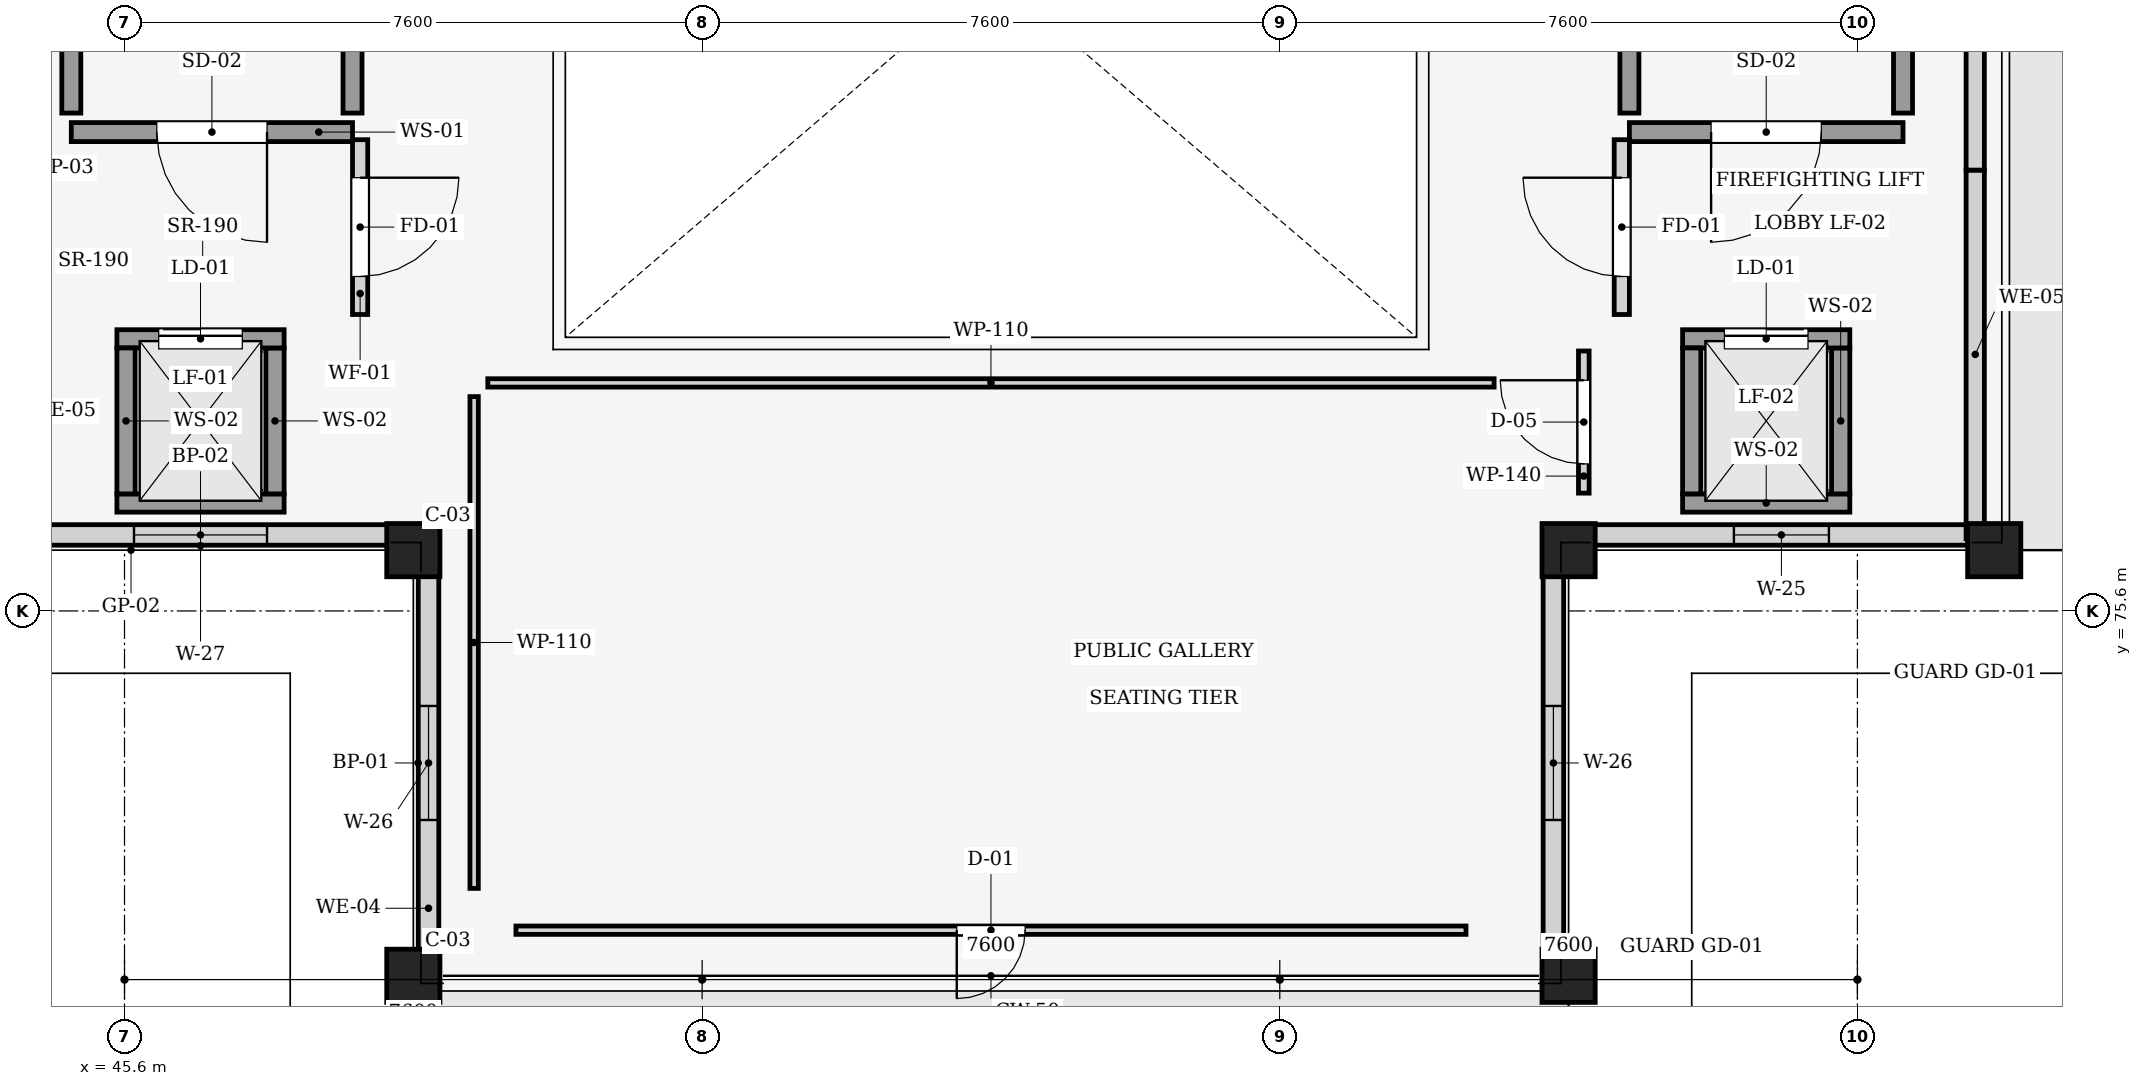
"""IFC4 building model, lengths in metres.
Left out: names, types, materials, properties, quantities, classifications, styles, units other than length and angle.
Written with IfcOpenShell. Run it as: python <this file> out.ifc"""

import sys

from ifc_helpers import new_model, si_unit, direction, frame, frame_2d, origin, origin_2d, place, context, subcontext, project, spatial, rectangle, extrude, element, fill, save


model = new_model("IFC4")
c1 = context("Model", 3, precision=1e-05, world=origin(), true_north=direction((0.0, 1.0)))
c2 = subcontext(c1, "Body", "Model", "MODEL_VIEW")
j1 = project(units=[si_unit("LENGTHUNIT", "METRE"), si_unit("PLANEANGLEUNIT", "RADIAN")], contexts=[c1])
p1 = place(None, origin())
s1 = spatial("IfcSite", under=j1, at=p1, CompositionType="ELEMENT")
p2 = place(p1, origin())
s2 = spatial("IfcBuilding", under=s1, at=p2, CompositionType="ELEMENT")
p3 = place(p2, frame((0.0, 0.0, 29.4)))
s3 = spatial("IfcBuildingStorey", under=s2, at=p3, CompositionType="ELEMENT", Elevation=29.4)
for number, where, z_axis, x_axis in (
    (1, (49.4, 70.8, 0.0), (0.0, 0.0, 1.0), (1.0, 0.0, 0.0)),
    (2, (49.4, 76.4, 0.0), (0.0, 0.0, 1.0), (1.0, 0.0, 0.0)),
    (3, (64.6, 70.8, 0.0), (0.0, 0.0, 1.0), (1.0, 0.0, 0.0)),
    (4, (64.6, 76.4, 0.0), (0.0, 0.0, 1.0), (1.0, 0.0, 0.0)),
):
    element("IfcColumn", number, at=place(p3, frame(where, z_axis=z_axis, x_axis=x_axis)), inside=s3, PredefinedType="COLUMN", context=c2, shape_type="SweptSolid", body=[
        extrude(rectangle(XDim=0.7, YDim=0.7, at=origin_2d()), origin(), (0.0, 0.0, 1.0), 5.0),
    ])
p4 = place(p3, frame((70.2, 76.4, 0.0), z_axis=(0.0, 0.0, 1.0), x_axis=(1.0, 0.0, 0.0)))
e5 = element("IfcColumn", 5, at=p4, inside=s3, PredefinedType="COLUMN", context=c2, shape_type="SweptSolid", body=[
    extrude(rectangle(XDim=0.7, YDim=0.7, at=origin_2d()), origin(), (0.0, 0.0, 1.0), 8.14),
])
p5 = place(p3, frame((49.6, 71.085, 0.0), z_axis=(0.0, 0.0, 1.0), x_axis=(0.0, 1.0, 0.0)))
e6 = element("IfcWall", 6, at=p5, inside=s3, PredefinedType="STANDARD", context=c2, shape_type="SweptSolid", body=[
    extrude(rectangle(XDim=5.03, YDim=0.27, at=frame_2d((2.515, 0.0))), origin(), (0.0, 0.0, 1.0), 4.425),
])
p6 = place(p5, frame((1.765, 0.0, 0.85)))
e7 = element("IfcOpeningElement", 7, at=p6, cuts=e6, PredefinedType="OPENING", context=c2, shape_type="SweptSolid", body=[
    extrude(rectangle(XDim=1.5, YDim=1.85, at=frame_2d((0.75, 0.925))), frame((0.0, 0.145, 0.0), z_axis=(0.0, -1.0, 0.0), x_axis=(1.0, 0.0, 0.0)), (0.0, 0.0, 1.0), 0.29),
])
p7 = place(p3, frame((49.115, 76.6, 0.0), z_axis=(0.0, 0.0, 1.0), x_axis=(-1.0, 0.0, 0.0)))
e8 = element("IfcWall", 8, at=p7, inside=s3, PredefinedType="STANDARD", context=c2, shape_type="SweptSolid", body=[
    extrude(rectangle(XDim=5.03, YDim=0.27, at=frame_2d((2.515, 0.0))), origin(), (0.0, 0.0, 1.0), 4.425),
])
p8 = place(p7, frame((1.64, 0.0, 0.85)))
e9 = element("IfcOpeningElement", 9, at=p8, cuts=e8, PredefinedType="OPENING", context=c2, shape_type="SweptSolid", body=[
    extrude(rectangle(XDim=1.75, YDim=1.85, at=frame_2d((0.875, 0.925))), frame((0.0, 0.145, 0.0), z_axis=(0.0, -1.0, 0.0), x_axis=(1.0, 0.0, 0.0)), (0.0, 0.0, 1.0), 0.29),
])
p9 = place(p3, frame((69.915, 76.6, 0.0), z_axis=(0.0, 0.0, 1.0), x_axis=(-1.0, 0.0, 0.0)))
e10 = element("IfcWall", 10, at=p9, inside=s3, PredefinedType="STANDARD", context=c2, shape_type="SweptSolid", body=[
    extrude(rectangle(XDim=5.03, YDim=0.27, at=frame_2d((2.515, 0.0))), origin(), (0.0, 0.0, 1.0), 4.425),
])
p10 = place(p9, frame((1.89, 0.0, 0.85)))
e11 = element("IfcOpeningElement", 11, at=p10, cuts=e10, PredefinedType="OPENING", context=c2, shape_type="SweptSolid", body=[
    extrude(rectangle(XDim=1.25, YDim=1.85, at=frame_2d((0.625, 0.925))), frame((0.0, 0.145, 0.0), z_axis=(0.0, -1.0, 0.0), x_axis=(1.0, 0.0, 0.0)), (0.0, 0.0, 1.0), 0.29),
])
p11 = place(p3, frame((64.4, 76.115, 0.0), z_axis=(0.0, 0.0, 1.0), x_axis=(0.0, -1.0, 0.0)))
e12 = element("IfcWall", 12, at=p11, inside=s3, PredefinedType="STANDARD", context=c2, shape_type="SweptSolid", body=[
    extrude(rectangle(XDim=5.03, YDim=0.27, at=frame_2d((2.515, 0.0))), origin(), (0.0, 0.0, 1.0), 4.425),
])
p12 = place(p11, frame((1.765, 0.0, 0.85)))
e13 = element("IfcOpeningElement", 13, at=p12, cuts=e12, PredefinedType="OPENING", context=c2, shape_type="SweptSolid", body=[
    extrude(rectangle(XDim=1.5, YDim=1.85, at=frame_2d((0.75, 0.925))), frame((0.0, 0.145, 0.0), z_axis=(0.0, -1.0, 0.0), x_axis=(1.0, 0.0, 0.0)), (0.0, 0.0, 1.0), 0.29),
])
p13 = place(p3, frame((69.95, 81.4, 4.7), z_axis=(0.0, 0.0, 1.0), x_axis=(0.0, -1.0, 0.0)))
e14 = element("IfcWall", 14, at=p13, inside=s3, PredefinedType="STANDARD", context=c2, shape_type="SweptSolid", body=[
    extrude(rectangle(XDim=4.85, YDim=0.24, at=frame_2d((2.425, 0.0))), origin(), (0.0, 0.0, 1.0), 3.8),
])
p14 = place(p3, frame((69.95, 86.6, 4.7), z_axis=(0.0, 0.0, 1.0), x_axis=(0.0, -1.0, 0.0)))
e15 = element("IfcWall", 15, at=p14, inside=s3, PredefinedType="STANDARD", context=c2, shape_type="SweptSolid", body=[
    extrude(rectangle(XDim=5.2, YDim=0.24, at=frame_2d((2.6, 0.0))), origin(), (0.0, 0.0, 1.0), 4.85),
])
p15 = place(p3, frame((48.6, 81.9, 0.0), z_axis=(0.0, 0.0, 1.0), x_axis=(-1.0, 0.0, 0.0)))
e16 = element("IfcWall", 16, at=p15, inside=s3, PredefinedType="SHEAR", context=c2, shape_type="SweptSolid", body=[
    extrude(rectangle(XDim=3.7, YDim=0.25, at=frame_2d((1.85, 0.0))), origin(), (0.0, 0.0, 1.0), 4.75),
])
p16 = place(p15, frame((1.125, 0.0, 0.0)))
e17 = element("IfcOpeningElement", 17, at=p16, cuts=e16, PredefinedType="OPENING", context=c2, shape_type="SweptSolid", body=[
    extrude(rectangle(XDim=1.45, YDim=2.2, at=frame_2d((0.725, 1.1))), frame((0.0, 0.135, 0.0), z_axis=(0.0, -1.0, 0.0), x_axis=(1.0, 0.0, 0.0)), (0.0, 0.0, 1.0), 0.27),
])
for number, where, z_axis, x_axis in (
    (18, (44.9, 82.15, 0.0), (0.0, 0.0, 1.0), (0.0, 1.0, 0.0)),
    (19, (48.6, 89.85, 0.0), (0.0, 0.0, 1.0), (0.0, -1.0, 0.0)),
):
    element("IfcWall", number, at=place(p3, frame(where, z_axis=z_axis, x_axis=x_axis)), inside=s3, PredefinedType="SHEAR", context=c2, shape_type="SweptSolid", body=[
        extrude(rectangle(XDim=7.7, YDim=0.25, at=frame_2d((3.85, 0.0))), origin(), (0.0, 0.0, 1.0), 4.75),
    ])
p17 = place(p3, frame((69.0, 81.9, 0.0), z_axis=(0.0, 0.0, 1.0), x_axis=(-1.0, 0.0, 0.0)))
e20 = element("IfcWall", 20, at=p17, inside=s3, PredefinedType="SHEAR", context=c2, shape_type="SweptSolid", body=[
    extrude(rectangle(XDim=3.6, YDim=0.25, at=frame_2d((1.8, 0.0))), origin(), (0.0, 0.0, 1.0), 4.75),
])
p18 = place(p17, frame((1.075, 0.0, 0.0)))
e21 = element("IfcOpeningElement", 21, at=p18, cuts=e20, PredefinedType="OPENING", context=c2, shape_type="SweptSolid", body=[
    extrude(rectangle(XDim=1.45, YDim=2.2, at=frame_2d((0.725, 1.1))), frame((0.0, 0.135, 0.0), z_axis=(0.0, -1.0, 0.0), x_axis=(1.0, 0.0, 0.0)), (0.0, 0.0, 1.0), 0.27),
])
for number, where, z_axis, x_axis in (
    (22, (65.4, 82.15, 0.0), (0.0, 0.0, 1.0), (0.0, 1.0, 0.0)),
    (23, (69.0, 89.85, 0.0), (0.0, 0.0, 1.0), (0.0, -1.0, 0.0)),
):
    element("IfcWall", number, at=place(p3, frame(where, z_axis=z_axis, x_axis=x_axis)), inside=s3, PredefinedType="SHEAR", context=c2, shape_type="SweptSolid", body=[
        extrude(rectangle(XDim=7.7, YDim=0.25, at=frame_2d((3.85, 0.0))), origin(), (0.0, 0.0, 1.0), 4.75),
    ])
p19 = place(p3, frame((47.7, 77.02, 0.0), z_axis=(0.0, 0.0, 1.0), x_axis=(-1.0, 0.0, 0.0)))
e24 = element("IfcWall", 24, at=p19, inside=s3, PredefinedType="SHEAR", context=c2, shape_type="SweptSolid", body=[
    extrude(rectangle(XDim=2.2, YDim=0.24, at=frame_2d((1.1, 0.0))), origin(), (0.0, 0.0, 1.0), 4.75),
])
p20 = place(p3, frame((47.58, 79.06, 0.0), z_axis=(0.0, 0.0, 1.0), x_axis=(0.0, -1.0, 0.0)))
e25 = element("IfcWall", 25, at=p20, inside=s3, PredefinedType="SHEAR", context=c2, shape_type="SweptSolid", body=[
    extrude(rectangle(XDim=1.92, YDim=0.24, at=frame_2d((0.96, 0.0))), origin(), (0.0, 0.0, 1.0), 4.75),
])
p21 = place(p3, frame((45.5, 79.18, 0.0), z_axis=(0.0, 0.0, 1.0), x_axis=(1.0, 0.0, 0.0)))
e26 = element("IfcWall", 26, at=p21, inside=s3, PredefinedType="SHEAR", context=c2, shape_type="SweptSolid", body=[
    extrude(rectangle(XDim=2.2, YDim=0.24, at=frame_2d((1.1, 0.0))), origin(), (0.0, 0.0, 1.0), 4.75),
])
p22 = place(p21, frame((0.55, 0.0, 0.0)))
e27 = element("IfcOpeningElement", 27, at=p22, cuts=e26, PredefinedType="OPENING", context=c2, shape_type="SweptSolid", body=[
    extrude(rectangle(XDim=1.1, YDim=2.15, at=frame_2d((0.55, 1.075))), frame((0.0, 0.13, 0.0), z_axis=(0.0, -1.0, 0.0), x_axis=(1.0, 0.0, 0.0)), (0.0, 0.0, 1.0), 0.26),
])
p23 = place(p3, frame((45.62, 77.14, 0.0), z_axis=(0.0, 0.0, 1.0), x_axis=(0.0, 1.0, 0.0)))
e28 = element("IfcWall", 28, at=p23, inside=s3, PredefinedType="SHEAR", context=c2, shape_type="SweptSolid", body=[
    extrude(rectangle(XDim=1.92, YDim=0.24, at=frame_2d((0.96, 0.0))), origin(), (0.0, 0.0, 1.0), 4.75),
])
p24 = place(p3, frame((48.7, 81.8, 0.0), z_axis=(0.0, 0.0, 1.0), x_axis=(0.0, -1.0, 0.0)))
e29 = element("IfcWall", 29, at=p24, inside=s3, PredefinedType="PARTITIONING", context=c2, shape_type="SweptSolid", body=[
    extrude(rectangle(XDim=2.3, YDim=0.2, at=frame_2d((1.15, 0.0))), origin(), (0.0, 0.0, 1.0), 2.9),
])
p25 = place(p24, frame((0.5, 0.0, 0.0)))
e30 = element("IfcOpeningElement", 30, at=p25, cuts=e29, PredefinedType="OPENING", context=c2, shape_type="SweptSolid", body=[
    extrude(rectangle(XDim=1.3, YDim=2.2, at=frame_2d((0.65, 1.1))), frame((0.0, 0.11, 0.0), z_axis=(0.0, -1.0, 0.0), x_axis=(1.0, 0.0, 0.0)), (0.0, 0.0, 1.0), 0.22),
])
p26 = place(p3, frame((68.3, 77.02, 0.0), z_axis=(0.0, 0.0, 1.0), x_axis=(-1.0, 0.0, 0.0)))
e31 = element("IfcWall", 31, at=p26, inside=s3, PredefinedType="SHEAR", context=c2, shape_type="SweptSolid", body=[
    extrude(rectangle(XDim=2.2, YDim=0.24, at=frame_2d((1.1, 0.0))), origin(), (0.0, 0.0, 1.0), 4.75),
])
p27 = place(p3, frame((68.18, 79.06, 0.0), z_axis=(0.0, 0.0, 1.0), x_axis=(0.0, -1.0, 0.0)))
e32 = element("IfcWall", 32, at=p27, inside=s3, PredefinedType="SHEAR", context=c2, shape_type="SweptSolid", body=[
    extrude(rectangle(XDim=1.92, YDim=0.24, at=frame_2d((0.96, 0.0))), origin(), (0.0, 0.0, 1.0), 4.75),
])
p28 = place(p3, frame((66.1, 79.18, 0.0), z_axis=(0.0, 0.0, 1.0), x_axis=(1.0, 0.0, 0.0)))
e33 = element("IfcWall", 33, at=p28, inside=s3, PredefinedType="SHEAR", context=c2, shape_type="SweptSolid", body=[
    extrude(rectangle(XDim=2.2, YDim=0.24, at=frame_2d((1.1, 0.0))), origin(), (0.0, 0.0, 1.0), 4.75),
])
p29 = place(p28, frame((0.55, 0.0, 0.0)))
e34 = element("IfcOpeningElement", 34, at=p29, cuts=e33, PredefinedType="OPENING", context=c2, shape_type="SweptSolid", body=[
    extrude(rectangle(XDim=1.1, YDim=2.15, at=frame_2d((0.55, 1.075))), frame((0.0, 0.13, 0.0), z_axis=(0.0, -1.0, 0.0), x_axis=(1.0, 0.0, 0.0)), (0.0, 0.0, 1.0), 0.26),
])
p30 = place(p3, frame((66.22, 77.14, 0.0), z_axis=(0.0, 0.0, 1.0), x_axis=(0.0, 1.0, 0.0)))
e35 = element("IfcWall", 35, at=p30, inside=s3, PredefinedType="SHEAR", context=c2, shape_type="SweptSolid", body=[
    extrude(rectangle(XDim=1.92, YDim=0.24, at=frame_2d((0.96, 0.0))), origin(), (0.0, 0.0, 1.0), 4.75),
])
p31 = place(p3, frame((65.3, 79.5, 0.0), z_axis=(0.0, 0.0, 1.0), x_axis=(0.0, 1.0, 0.0)))
e36 = element("IfcWall", 36, at=p31, inside=s3, PredefinedType="PARTITIONING", context=c2, shape_type="SweptSolid", body=[
    extrude(rectangle(XDim=2.3, YDim=0.2, at=frame_2d((1.15, 0.0))), origin(), (0.0, 0.0, 1.0), 2.9),
])
p32 = place(p31, frame((0.5, 0.0, 0.0)))
e37 = element("IfcOpeningElement", 37, at=p32, cuts=e36, PredefinedType="OPENING", context=c2, shape_type="SweptSolid", body=[
    extrude(rectangle(XDim=1.3, YDim=2.2, at=frame_2d((0.65, 1.1))), frame((0.0, 0.11, 0.0), z_axis=(0.0, -1.0, 0.0), x_axis=(1.0, 0.0, 0.0)), (0.0, 0.0, 1.0), 0.22),
])
p33 = place(p3, frame((50.2, 71.95, 0.0), z_axis=(0.0, 0.0, 1.0), x_axis=(0.0, 1.0, 0.0)))
e38 = element("IfcWall", 38, at=p33, inside=s3, PredefinedType="PARTITIONING", context=c2, shape_type="SweptSolid", body=[
    extrude(rectangle(XDim=6.47, YDim=0.11, at=frame_2d((3.235, 0.0))), origin(), (0.0, 0.0, 1.0), 4.57),
])
p34 = place(p3, frame((50.38, 78.6, 0.0), z_axis=(0.0, 0.0, 1.0), x_axis=(1.0, 0.0, 0.0)))
e39 = element("IfcWall", 39, at=p34, inside=s3, PredefinedType="PARTITIONING", context=c2, shape_type="SweptSolid", body=[
    extrude(rectangle(XDim=13.24, YDim=0.11, at=frame_2d((6.62, 0.0))), origin(), (0.0, 0.0, 1.0), 4.57),
])
p35 = place(p3, frame((63.25, 71.4, 0.0), z_axis=(0.0, 0.0, 1.0), x_axis=(-1.0, 0.0, 0.0)))
e40 = element("IfcWall", 40, at=p35, inside=s3, PredefinedType="PARTITIONING", context=c2, shape_type="SweptSolid", body=[
    extrude(rectangle(XDim=12.5, YDim=0.11, at=frame_2d((6.25, 0.0))), origin(), (0.0, 0.0, 1.0), 4.57),
])
p36 = place(p35, frame((5.8, 0.0, 0.0)))
e41 = element("IfcOpeningElement", 41, at=p36, cuts=e40, PredefinedType="OPENING", context=c2, shape_type="SweptSolid", body=[
    extrude(rectangle(XDim=0.9, YDim=2.1, at=frame_2d((0.45, 1.05))), frame((0.0, 0.065, 0.0), z_axis=(0.0, -1.0, 0.0), x_axis=(1.0, 0.0, 0.0)), (0.0, 0.0, 1.0), 0.13),
])
p37 = place(p3, frame((64.8, 77.15, 0.0), z_axis=(0.0, 0.0, 1.0), x_axis=(0.0, 1.0, 0.0)))
e42 = element("IfcWall", 42, at=p37, inside=s3, PredefinedType="PARTITIONING", context=c2, shape_type="SweptSolid", body=[
    extrude(rectangle(XDim=1.87, YDim=0.14, at=frame_2d((0.935, 0.0))), origin(), (0.0, 0.0, 1.0), 4.57),
])
p38 = place(p37, frame((0.385, 0.0, 0.0)))
e43 = element("IfcOpeningElement", 43, at=p38, cuts=e42, PredefinedType="OPENING", context=c2, shape_type="SweptSolid", body=[
    extrude(rectangle(XDim=1.1, YDim=2.1, at=frame_2d((0.55, 1.05))), frame((0.0, 0.08, 0.0), z_axis=(0.0, -1.0, 0.0), x_axis=(1.0, 0.0, 0.0)), (0.0, 0.0, 1.0), 0.16),
])
p39 = place(p6, origin())
e44 = element("IfcWindow", 44, at=p39, inside=s3, PartitioningType="SINGLE_PANEL", PredefinedType="WINDOW", context=c2, shape_type="SweptSolid", body=[
    extrude(rectangle(XDim=1.5, YDim=1.85, at=frame_2d((0.75, 0.925))), frame((0.0, 0.03, 0.0), z_axis=(0.0, -1.0, 0.0), x_axis=(1.0, 0.0, 0.0)), (0.0, 0.0, 1.0), 0.06),
])
fill(e7, e44)
p40 = place(p8, origin())
e45 = element("IfcWindow", 45, at=p40, inside=s3, PartitioningType="SINGLE_PANEL", PredefinedType="WINDOW", context=c2, shape_type="SweptSolid", body=[
    extrude(rectangle(XDim=1.75, YDim=1.85, at=frame_2d((0.875, 0.925))), frame((0.0, 0.03, 0.0), z_axis=(0.0, -1.0, 0.0), x_axis=(1.0, 0.0, 0.0)), (0.0, 0.0, 1.0), 0.06),
])
fill(e9, e45)
p41 = place(p10, origin())
e46 = element("IfcWindow", 46, at=p41, inside=s3, PartitioningType="SINGLE_PANEL", PredefinedType="WINDOW", context=c2, shape_type="SweptSolid", body=[
    extrude(rectangle(XDim=1.25, YDim=1.85, at=frame_2d((0.625, 0.925))), frame((0.0, 0.03, 0.0), z_axis=(0.0, -1.0, 0.0), x_axis=(1.0, 0.0, 0.0)), (0.0, 0.0, 1.0), 0.06),
])
fill(e11, e46)
p42 = place(p12, origin())
e47 = element("IfcWindow", 47, at=p42, inside=s3, PartitioningType="SINGLE_PANEL", PredefinedType="WINDOW", context=c2, shape_type="SweptSolid", body=[
    extrude(rectangle(XDim=1.5, YDim=1.85, at=frame_2d((0.75, 0.925))), frame((0.0, 0.03, 0.0), z_axis=(0.0, -1.0, 0.0), x_axis=(1.0, 0.0, 0.0)), (0.0, 0.0, 1.0), 0.06),
])
fill(e13, e47)
p43 = place(p16, origin())
e48 = element("IfcDoor", 48, at=p43, inside=s3, OperationType="SINGLE_SWING_LEFT", PredefinedType="DOOR", context=c2, shape_type="SweptSolid", body=[
    extrude(rectangle(XDim=1.45, YDim=2.2, at=frame_2d((0.725, 1.1))), frame((0.0, 0.025, 0.0), z_axis=(0.0, -1.0, 0.0), x_axis=(1.0, 0.0, 0.0)), (0.0, 0.0, 1.0), 0.05),
])
fill(e17, e48)
p44 = place(p18, origin())
e49 = element("IfcDoor", 49, at=p44, inside=s3, OperationType="SINGLE_SWING_RIGHT", PredefinedType="DOOR", context=c2, shape_type="SweptSolid", body=[
    extrude(rectangle(XDim=1.45, YDim=2.2, at=frame_2d((0.725, 1.1))), frame((0.0, 0.025, 0.0), z_axis=(0.0, -1.0, 0.0), x_axis=(1.0, 0.0, 0.0)), (0.0, 0.0, 1.0), 0.05),
])
fill(e21, e49)
p45 = place(p22, origin())
e50 = element("IfcDoor", 50, at=p45, inside=s3, OperationType="SLIDING_TO_LEFT", PredefinedType="DOOR", context=c2, shape_type="SweptSolid", body=[
    extrude(rectangle(XDim=1.1, YDim=2.15, at=frame_2d((0.55, 1.075))), frame((0.0, 0.025, 0.0), z_axis=(0.0, -1.0, 0.0), x_axis=(1.0, 0.0, 0.0)), (0.0, 0.0, 1.0), 0.05),
])
fill(e27, e50)
p46 = place(p25, origin())
e51 = element("IfcDoor", 51, at=p46, inside=s3, OperationType="SINGLE_SWING_LEFT", PredefinedType="DOOR", context=c2, shape_type="SweptSolid", body=[
    extrude(rectangle(XDim=1.3, YDim=2.2, at=frame_2d((0.65, 1.1))), frame((0.0, 0.025, 0.0), z_axis=(0.0, -1.0, 0.0), x_axis=(1.0, 0.0, 0.0)), (0.0, 0.0, 1.0), 0.05),
])
fill(e30, e51)
p47 = place(p29, origin())
e52 = element("IfcDoor", 52, at=p47, inside=s3, OperationType="SLIDING_TO_RIGHT", PredefinedType="DOOR", context=c2, shape_type="SweptSolid", body=[
    extrude(rectangle(XDim=1.1, YDim=2.15, at=frame_2d((0.55, 1.075))), frame((0.0, 0.025, 0.0), z_axis=(0.0, -1.0, 0.0), x_axis=(1.0, 0.0, 0.0)), (0.0, 0.0, 1.0), 0.05),
])
fill(e34, e52)
p48 = place(p32, origin())
e53 = element("IfcDoor", 53, at=p48, inside=s3, OperationType="SINGLE_SWING_RIGHT", PredefinedType="DOOR", context=c2, shape_type="SweptSolid", body=[
    extrude(rectangle(XDim=1.3, YDim=2.2, at=frame_2d((0.65, 1.1))), frame((0.0, 0.025, 0.0), z_axis=(0.0, -1.0, 0.0), x_axis=(1.0, 0.0, 0.0)), (0.0, 0.0, 1.0), 0.05),
])
fill(e37, e53)
p49 = place(p36, origin())
e54 = element("IfcDoor", 54, at=p49, inside=s3, OperationType="SINGLE_SWING_RIGHT", PredefinedType="DOOR", context=c2, shape_type="SweptSolid", body=[
    extrude(rectangle(XDim=0.9, YDim=2.1, at=frame_2d((0.45, 1.05))), frame((0.0, 0.025, 0.0), z_axis=(0.0, -1.0, 0.0), x_axis=(1.0, 0.0, 0.0)), (0.0, 0.0, 1.0), 0.05),
])
fill(e41, e54)
p50 = place(p38, origin())
e55 = element("IfcDoor", 55, at=p50, inside=s3, OperationType="SINGLE_SWING_RIGHT", PredefinedType="DOOR", context=c2, shape_type="SweptSolid", body=[
    extrude(rectangle(XDim=1.1, YDim=2.1, at=frame_2d((0.55, 1.05))), frame((0.0, 0.025, 0.0), z_axis=(0.0, -1.0, 0.0), x_axis=(1.0, 0.0, 0.0)), (0.0, 0.0, 1.0), 0.05),
])
fill(e43, e55)
save(model, sys.argv[1])
